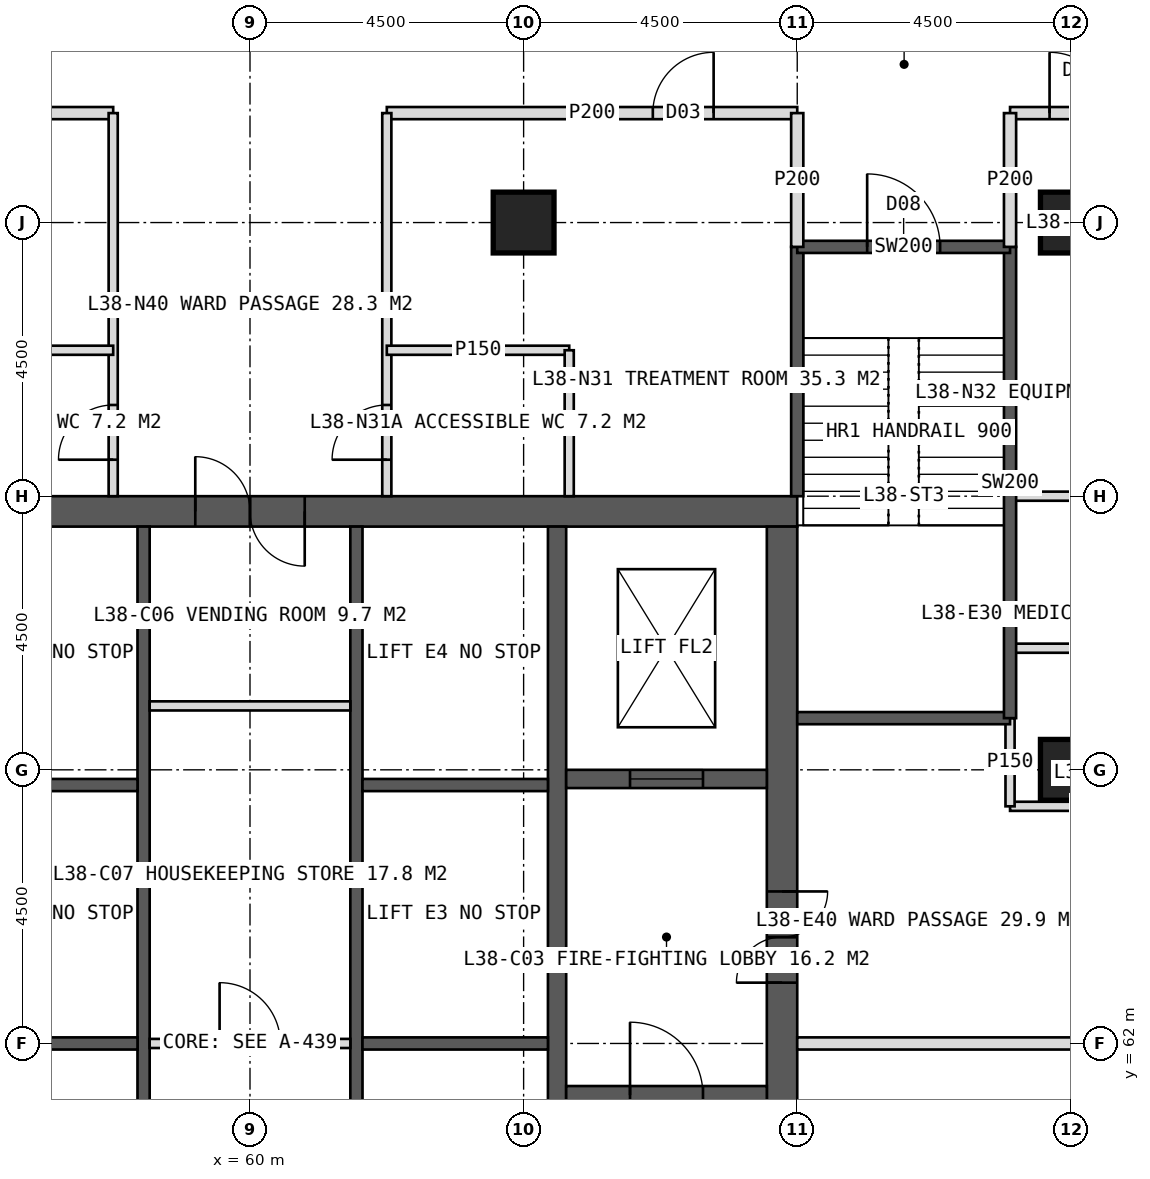
"""IFC4 building model, lengths in metres.
Left out: names, types, materials, properties, quantities, classifications, styles, units other than length and angle.
Written with IfcOpenShell. Run it as: python <this file> out.ifc"""

import sys

from ifc_helpers import new_model, si_unit, direction, frame, frame_2d, origin, origin_2d, place, context, subcontext, project, spatial, rectangle, hollow_rectangle, extrude, element, fill, save


model = new_model("IFC4")
c1 = context("Model", 3, precision=1e-05, world=origin(), true_north=direction((0.0, 1.0)))
c2 = subcontext(c1, "Body", "Model", "MODEL_VIEW")
j1 = project(units=[si_unit("LENGTHUNIT", "METRE"), si_unit("PLANEANGLEUNIT", "RADIAN")], contexts=[c1])
p1 = place(None, origin())
s1 = spatial("IfcSite", under=j1, at=p1, CompositionType="ELEMENT")
p2 = place(p1, origin())
s2 = spatial("IfcBuilding", under=s1, at=p2, CompositionType="ELEMENT")
p3 = place(p2, frame((0.0, 0.0, 160.0)))
s3 = spatial("IfcBuildingStorey", under=s2, at=p3, CompositionType="ELEMENT", Elevation=160.0)
p4 = place(p3, frame((51.0, 70.75, 0.0), z_axis=(0.0, 0.0, 1.0), x_axis=(1.0, 0.0, 0.0)))
e1 = element("IfcWall", 1, at=p4, inside=s3, PredefinedType="SHEAR", context=c2, shape_type="SweptSolid", body=[
    extrude(rectangle(XDim=18.0, YDim=0.5, at=frame_2d((9.0, 0.0))), origin(), (0.0, 0.0, 1.0), 4.0),
])
p5 = place(p4, frame((8.1, 0.0, 0.0)))
e2 = element("IfcOpeningElement", 2, at=p5, cuts=e1, PredefinedType="OPENING", context=c2, shape_type="SweptSolid", body=[
    extrude(rectangle(XDim=1.8, YDim=2.2, at=frame_2d((0.9, 1.1))), frame((0.0, 0.26, 0.0), z_axis=(0.0, -1.0, 0.0), x_axis=(1.0, 0.0, 0.0)), (0.0, 0.0, 1.0), 0.52),
])
p6 = place(p3, frame((68.75, 53.5, 0.0), z_axis=(0.0, 0.0, 1.0), x_axis=(0.0, 1.0, 0.0)))
e3 = element("IfcWall", 3, at=p6, inside=s3, PredefinedType="SHEAR", context=c2, shape_type="SweptSolid", body=[
    extrude(rectangle(XDim=17.0, YDim=0.5, at=frame_2d((8.5, 0.0))), origin(), (0.0, 0.0, 1.0), 4.0),
])
p7 = place(p6, frame((9.5, 0.0, 0.0)))
e4 = element("IfcOpeningElement", 4, at=p7, cuts=e3, PredefinedType="OPENING", context=c2, shape_type="SweptSolid", body=[
    extrude(rectangle(XDim=1.5, YDim=2.2, at=frame_2d((0.75, 1.1))), frame((0.0, 0.26, 0.0), z_axis=(0.0, -1.0, 0.0), x_axis=(1.0, 0.0, 0.0)), (0.0, 0.0, 1.0), 0.52),
])
p8 = place(p3, frame((65.05, 53.5, 0.0), z_axis=(0.0, 0.0, 1.0), x_axis=(0.0, 1.0, 0.0)))
e5 = element("IfcWall", 5, at=p8, inside=s3, PredefinedType="SHEAR", context=c2, shape_type="SweptSolid", body=[
    extrude(rectangle(XDim=17.0, YDim=0.3, at=frame_2d((8.5, 0.0))), origin(), (0.0, 0.0, 1.0), 4.0),
])
p9 = place(p3, frame((58.25, 53.5, 0.0), z_axis=(0.0, 0.0, 1.0), x_axis=(0.0, 1.0, 0.0)))
e6 = element("IfcWall", 6, at=p9, inside=s3, PredefinedType="SHEAR", context=c2, shape_type="SweptSolid", body=[
    extrude(rectangle(XDim=17.0, YDim=0.2, at=frame_2d((8.5, 0.0))), origin(), (0.0, 0.0, 1.0), 4.0),
])
p10 = place(p9, frame((1.375, 0.0, 0.0)))
e7 = element("IfcOpeningElement", 7, at=p10, cuts=e6, PredefinedType="OPENING", context=c2, shape_type="SweptSolid", body=[
    extrude(rectangle(XDim=1.4, YDim=2.2, at=frame_2d((0.7, 1.1))), frame((0.0, 0.11, 0.0), z_axis=(0.0, -1.0, 0.0), x_axis=(1.0, 0.0, 0.0)), (0.0, 0.0, 1.0), 0.22),
])
p11 = place(p9, frame((5.675, 0.0, 0.0)))
e8 = element("IfcOpeningElement", 8, at=p11, cuts=e6, PredefinedType="OPENING", context=c2, shape_type="SweptSolid", body=[
    extrude(rectangle(XDim=1.4, YDim=2.2, at=frame_2d((0.7, 1.1))), frame((0.0, 0.11, 0.0), z_axis=(0.0, -1.0, 0.0), x_axis=(1.0, 0.0, 0.0)), (0.0, 0.0, 1.0), 0.22),
])
p12 = place(p3, frame((61.75, 53.5, 0.0), z_axis=(0.0, 0.0, 1.0), x_axis=(0.0, 1.0, 0.0)))
e9 = element("IfcWall", 9, at=p12, inside=s3, PredefinedType="SHEAR", context=c2, shape_type="SweptSolid", body=[
    extrude(rectangle(XDim=17.0, YDim=0.2, at=frame_2d((8.5, 0.0))), origin(), (0.0, 0.0, 1.0), 4.0),
])
p13 = place(p12, frame((1.375, 0.0, 0.0)))
e10 = element("IfcOpeningElement", 10, at=p13, cuts=e9, PredefinedType="OPENING", context=c2, shape_type="SweptSolid", body=[
    extrude(rectangle(XDim=1.4, YDim=2.2, at=frame_2d((0.7, 1.1))), frame((0.0, 0.11, 0.0), z_axis=(0.0, -1.0, 0.0), x_axis=(1.0, 0.0, 0.0)), (0.0, 0.0, 1.0), 0.22),
])
p14 = place(p12, frame((5.675, 0.0, 0.0)))
e11 = element("IfcOpeningElement", 11, at=p14, cuts=e9, PredefinedType="OPENING", context=c2, shape_type="SweptSolid", body=[
    extrude(rectangle(XDim=1.4, YDim=2.2, at=frame_2d((0.7, 1.1))), frame((0.0, 0.11, 0.0), z_axis=(0.0, -1.0, 0.0), x_axis=(1.0, 0.0, 0.0)), (0.0, 0.0, 1.0), 0.22),
])
for number, where, z_axis, x_axis in (
    (12, (55.1, 62.0, 0.0), (0.0, 0.0, 1.0), (1.0, 0.0, 0.0)),
    (13, (61.85, 62.0, 0.0), (0.0, 0.0, 1.0), (1.0, 0.0, 0.0)),
    (14, (55.1, 66.25, 0.0), (0.0, 0.0, 1.0), (1.0, 0.0, 0.0)),
    (15, (61.85, 66.25, 0.0), (0.0, 0.0, 1.0), (1.0, 0.0, 0.0)),
):
    element("IfcWall", number, at=place(p3, frame(where, z_axis=z_axis, x_axis=x_axis)), inside=s3, PredefinedType="SHEAR", context=c2, shape_type="SweptSolid", body=[
        extrude(rectangle(XDim=3.05, YDim=0.2, at=frame_2d((1.525, 0.0))), origin(), (0.0, 0.0, 1.0), 4.0),
    ])
p15 = place(p3, frame((65.2, 61.15, 0.0), z_axis=(0.0, 0.0, 1.0), x_axis=(1.0, 0.0, 0.0)))
e16 = element("IfcWall", 16, at=p15, inside=s3, PredefinedType="SHEAR", context=c2, shape_type="SweptSolid", body=[
    extrude(rectangle(XDim=3.3, YDim=0.3, at=frame_2d((1.65, 0.0))), origin(), (0.0, 0.0, 1.0), 4.0),
])
p16 = place(p15, frame((1.05, 0.0, 0.0)))
e17 = element("IfcOpeningElement", 17, at=p16, cuts=e16, PredefinedType="OPENING", context=c2, shape_type="SweptSolid", body=[
    extrude(rectangle(XDim=1.2, YDim=2.1, at=frame_2d((0.6, 1.05))), frame((0.0, 0.16, 0.0), z_axis=(0.0, -1.0, 0.0), x_axis=(1.0, 0.0, 0.0)), (0.0, 0.0, 1.0), 0.32),
])
p17 = place(p3, frame((65.2, 66.35, 0.0), z_axis=(0.0, 0.0, 1.0), x_axis=(1.0, 0.0, 0.0)))
e18 = element("IfcWall", 18, at=p17, inside=s3, PredefinedType="SHEAR", context=c2, shape_type="SweptSolid", body=[
    extrude(rectangle(XDim=3.3, YDim=0.3, at=frame_2d((1.65, 0.0))), origin(), (0.0, 0.0, 1.0), 4.0),
])
p18 = place(p17, frame((1.05, 0.0, 0.0)))
e19 = element("IfcOpeningElement", 19, at=p18, cuts=e18, PredefinedType="OPENING", context=c2, shape_type="SweptSolid", body=[
    extrude(rectangle(XDim=1.2, YDim=2.2, at=frame_2d((0.6, 1.1))), frame((0.0, 0.16, 0.0), z_axis=(0.0, -1.0, 0.0), x_axis=(1.0, 0.0, 0.0)), (0.0, 0.0, 1.0), 0.32),
])
for number, where, z_axis, x_axis in (
    (20, (73.5, 75.5, 0.0), (0.0, 0.0, 1.0), (1.0, 0.0, 0.0)),
    (21, (64.5, 75.5, 0.0), (0.0, 0.0, 1.0), (1.0, 0.0, 0.0)),
    (22, (73.5, 66.5, 0.0), (0.0, 0.0, 1.0), (1.0, 0.0, 0.0)),
):
    element("IfcColumn", number, at=place(p3, frame(where, z_axis=z_axis, x_axis=x_axis)), inside=s3, PredefinedType="COLUMN", context=c2, shape_type="SweptSolid", body=[
        extrude(hollow_rectangle(XDim=1.0, YDim=1.0, WallThickness=0.1, at=origin_2d()), origin(), (0.0, 0.0, 1.0), 4.0),
    ])
p19 = place(p3, frame((44.7, 77.3, 0.0), z_axis=(0.0, 0.0, 1.0), x_axis=(1.0, 0.0, 0.0)))
e23 = element("IfcWall", 23, at=p19, inside=s3, PredefinedType="PARTITIONING", context=c2, shape_type="SweptSolid", body=[
    extrude(rectangle(XDim=13.05, YDim=0.2, at=frame_2d((6.525, 0.0))), origin(), (0.0, 0.0, 1.0), 3.75),
])
p20 = place(p19, frame((9.175, 0.0, 0.0)))
e24 = element("IfcOpeningElement", 24, at=p20, cuts=e23, PredefinedType="OPENING", context=c2, shape_type="SweptSolid", body=[
    extrude(rectangle(XDim=1.0, YDim=2.1, at=frame_2d((0.5, 1.05))), frame((0.0, 0.11, 0.0), z_axis=(0.0, -1.0, 0.0), x_axis=(1.0, 0.0, 0.0)), (0.0, 0.0, 1.0), 0.22),
])
p21 = place(p3, frame((62.25, 77.3, 0.0), z_axis=(0.0, 0.0, 1.0), x_axis=(1.0, 0.0, 0.0)))
e25 = element("IfcWall", 25, at=p21, inside=s3, PredefinedType="PARTITIONING", context=c2, shape_type="SweptSolid", body=[
    extrude(rectangle(XDim=6.75, YDim=0.2, at=frame_2d((3.375, 0.0))), origin(), (0.0, 0.0, 1.0), 3.75),
])
p22 = place(p21, frame((4.375, 0.0, 0.0)))
e26 = element("IfcOpeningElement", 26, at=p22, cuts=e25, PredefinedType="OPENING", context=c2, shape_type="SweptSolid", body=[
    extrude(rectangle(XDim=1.0, YDim=2.1, at=frame_2d((0.5, 1.05))), frame((0.0, 0.11, 0.0), z_axis=(0.0, -1.0, 0.0), x_axis=(1.0, 0.0, 0.0)), (0.0, 0.0, 1.0), 0.22),
])
p23 = place(p3, frame((72.5, 77.3, 0.0), z_axis=(0.0, 0.0, 1.0), x_axis=(1.0, 0.0, 0.0)))
e27 = element("IfcWall", 27, at=p23, inside=s3, PredefinedType="PARTITIONING", context=c2, shape_type="SweptSolid", body=[
    extrude(rectangle(XDim=2.8, YDim=0.2, at=frame_2d((1.4, 0.0))), origin(), (0.0, 0.0, 1.0), 3.75),
])
p24 = place(p23, frame((0.65, 0.0, 0.0)))
e28 = element("IfcOpeningElement", 28, at=p24, cuts=e27, PredefinedType="OPENING", context=c2, shape_type="SweptSolid", body=[
    extrude(rectangle(XDim=1.0, YDim=2.1, at=frame_2d((0.5, 1.05))), frame((0.0, 0.11, 0.0), z_axis=(0.0, -1.0, 0.0), x_axis=(1.0, 0.0, 0.0)), (0.0, 0.0, 1.0), 0.22),
])
p25 = place(p3, frame((57.75, 71.0, 0.0), z_axis=(0.0, 0.0, 1.0), x_axis=(0.0, 1.0, 0.0)))
e29 = element("IfcWall", 29, at=p25, inside=s3, PredefinedType="PARTITIONING", context=c2, shape_type="SweptSolid", body=[
    extrude(rectangle(XDim=6.3, YDim=0.15, at=frame_2d((3.15, 0.0))), origin(), (0.0, 0.0, 1.0), 3.75),
])
p26 = place(p25, frame((0.6, 0.0, 0.0)))
e30 = element("IfcOpeningElement", 30, at=p26, cuts=e29, PredefinedType="OPENING", context=c2, shape_type="SweptSolid", body=[
    extrude(rectangle(XDim=0.9, YDim=2.1, at=frame_2d((0.45, 1.05))), frame((0.0, 0.085, 0.0), z_axis=(0.0, -1.0, 0.0), x_axis=(1.0, 0.0, 0.0)), (0.0, 0.0, 1.0), 0.17),
])
p27 = place(p3, frame((62.25, 71.0, 0.0), z_axis=(0.0, 0.0, 1.0), x_axis=(0.0, 1.0, 0.0)))
e31 = element("IfcWall", 31, at=p27, inside=s3, PredefinedType="PARTITIONING", context=c2, shape_type="SweptSolid", body=[
    extrude(rectangle(XDim=6.3, YDim=0.15, at=frame_2d((3.15, 0.0))), origin(), (0.0, 0.0, 1.0), 3.75),
])
p28 = place(p27, frame((0.6, 0.0, 0.0)))
e32 = element("IfcOpeningElement", 32, at=p28, cuts=e31, PredefinedType="OPENING", context=c2, shape_type="SweptSolid", body=[
    extrude(rectangle(XDim=0.9, YDim=2.1, at=frame_2d((0.45, 1.05))), frame((0.0, 0.085, 0.0), z_axis=(0.0, -1.0, 0.0), x_axis=(1.0, 0.0, 0.0)), (0.0, 0.0, 1.0), 0.17),
])
for number, where, z_axis, x_axis in (
    (33, (54.75, 73.4, 0.0), (0.0, 0.0, 1.0), (1.0, 0.0, 0.0)),
    (34, (62.25, 73.4, 0.0), (0.0, 0.0, 1.0), (1.0, 0.0, 0.0)),
):
    element("IfcWall", number, at=place(p3, frame(where, z_axis=z_axis, x_axis=x_axis)), inside=s3, PredefinedType="PARTITIONING", context=c2, shape_type="SweptSolid", body=[
        extrude(rectangle(XDim=3.0, YDim=0.15, at=frame_2d((1.5, 0.0))), origin(), (0.0, 0.0, 1.0), 3.75),
    ])
p29 = place(p3, frame((65.25, 71.0, 0.0), z_axis=(0.0, 0.0, 1.0), x_axis=(0.0, 1.0, 0.0)))
e35 = element("IfcWall", 35, at=p29, inside=s3, PredefinedType="PARTITIONING", context=c2, shape_type="SweptSolid", body=[
    extrude(rectangle(XDim=2.4, YDim=0.15, at=frame_2d((1.2, 0.0))), origin(), (0.0, 0.0, 1.0), 3.75),
])
for number, where, z_axis, x_axis in (
    (36, (72.5, 71.0, 0.0), (0.0, 0.0, 1.0), (1.0, 0.0, 0.0)),
    (37, (72.5, 65.9, 0.0), (0.0, 0.0, 1.0), (1.0, 0.0, 0.0)),
):
    element("IfcWall", number, at=place(p3, frame(where, z_axis=z_axis, x_axis=x_axis)), inside=s3, PredefinedType="PARTITIONING", context=c2, shape_type="SweptSolid", body=[
        extrude(rectangle(XDim=2.8, YDim=0.15, at=frame_2d((1.4, 0.0))), origin(), (0.0, 0.0, 1.0), 3.75),
    ])
p30 = place(p3, frame((69.0, 62.0, 0.0), z_axis=(0.0, 0.0, 1.0), x_axis=(1.0, 0.0, 0.0)))
e38 = element("IfcWall", 38, at=p30, inside=s3, PredefinedType="SOLIDWALL", context=c2, shape_type="SweptSolid", body=[
    extrude(rectangle(XDim=6.3, YDim=0.2, at=frame_2d((3.15, 0.0))), origin(), (0.0, 0.0, 1.0), 2.95),
])
p31 = place(p3, frame((72.5, 68.5, 0.0), z_axis=(0.0, 0.0, 1.0), x_axis=(1.0, 0.0, 0.0)))
e39 = element("IfcWall", 39, at=p31, inside=s3, PredefinedType="PARTITIONING", context=c2, shape_type="SweptSolid", body=[
    extrude(rectangle(XDim=2.8, YDim=0.15, at=frame_2d((1.4, 0.0))), origin(), (0.0, 0.0, 1.0), 3.75),
])
p32 = place(p3, frame((58.35, 62.0, 0.0), z_axis=(0.0, 0.0, 1.0), x_axis=(1.0, 0.0, 0.0)))
e40 = element("IfcWall", 40, at=p32, inside=s3, PredefinedType="PARTITIONING", context=c2, shape_type="SweptSolid", body=[
    extrude(rectangle(XDim=3.3, YDim=0.15, at=frame_2d((1.65, 0.0))), origin(), (0.0, 0.0, 1.0), 3.75),
])
p33 = place(p32, frame((1.15, 0.0, 0.0)))
e41 = element("IfcOpeningElement", 41, at=p33, cuts=e40, PredefinedType="OPENING", context=c2, shape_type="SweptSolid", body=[
    extrude(rectangle(XDim=1.0, YDim=2.1, at=frame_2d((0.5, 1.05))), frame((0.0, 0.085, 0.0), z_axis=(0.0, -1.0, 0.0), x_axis=(1.0, 0.0, 0.0)), (0.0, 0.0, 1.0), 0.17),
])
p34 = place(p3, frame((58.35, 67.551, 0.0), z_axis=(0.0, 0.0, 1.0), x_axis=(1.0, 0.0, 0.0)))
e42 = element("IfcWall", 42, at=p34, inside=s3, PredefinedType="PARTITIONING", context=c2, shape_type="SweptSolid", body=[
    extrude(rectangle(XDim=3.3, YDim=0.15, at=frame_2d((1.65, 0.0))), origin(), (0.0, 0.0, 1.0), 3.75),
])
p35 = place(p3, frame((72.5, 65.9, 0.0), z_axis=(0.0, 0.0, 1.0), x_axis=(0.0, 1.0, 0.0)))
e43 = element("IfcWall", 43, at=p35, inside=s3, PredefinedType="PARTITIONING", context=c2, shape_type="SweptSolid", body=[
    extrude(rectangle(XDim=1.45, YDim=0.15, at=frame_2d((0.725, 0.0))), origin(), (0.0, 0.0, 1.0), 3.75),
])
p36 = place(p3, frame((69.0, 71.0, 0.0), z_axis=(0.0, 0.0, 1.0), x_axis=(0.0, 1.0, 0.0)))
e44 = element("IfcWall", 44, at=p36, inside=s3, PredefinedType="SOLIDWALL", context=c2, shape_type="SweptSolid", body=[
    extrude(rectangle(XDim=4.1, YDim=0.2, at=frame_2d((2.05, 0.0))), origin(), (0.0, 0.0, 1.0), 3.75),
])
p37 = place(p3, frame((69.0, 67.35, 0.0), z_axis=(0.0, 0.0, 1.0), x_axis=(1.0, 0.0, 0.0)))
e45 = element("IfcWall", 45, at=p37, inside=s3, PredefinedType="SOLIDWALL", context=c2, shape_type="SweptSolid", body=[
    extrude(rectangle(XDim=3.5, YDim=0.2, at=frame_2d((1.75, 0.0))), origin(), (0.0, 0.0, 1.0), 3.75),
])
p38 = place(p3, frame((72.5, 67.35, 0.0), z_axis=(0.0, 0.0, 1.0), x_axis=(0.0, 1.0, 0.0)))
e46 = element("IfcWall", 46, at=p38, inside=s3, PredefinedType="SOLIDWALL", context=c2, shape_type="SweptSolid", body=[
    extrude(rectangle(XDim=7.75, YDim=0.2, at=frame_2d((3.875, 0.0))), origin(), (0.0, 0.0, 1.0), 3.75),
])
p39 = place(p3, frame((69.0, 75.1, 0.0), z_axis=(0.0, 0.0, 1.0), x_axis=(1.0, 0.0, 0.0)))
e47 = element("IfcWall", 47, at=p39, inside=s3, PredefinedType="SOLIDWALL", context=c2, shape_type="SweptSolid", body=[
    extrude(rectangle(XDim=3.5, YDim=0.2, at=frame_2d((1.75, 0.0))), origin(), (0.0, 0.0, 1.0), 3.75),
])
p40 = place(p39, frame((1.15, 0.0, 0.0)))
e48 = element("IfcOpeningElement", 48, at=p40, cuts=e47, PredefinedType="OPENING", context=c2, shape_type="SweptSolid", body=[
    extrude(rectangle(XDim=1.2, YDim=2.1, at=frame_2d((0.6, 1.05))), frame((0.0, 0.11, 0.0), z_axis=(0.0, -1.0, 0.0), x_axis=(1.0, 0.0, 0.0)), (0.0, 0.0, 1.0), 0.22),
])
for number, where, z_axis, x_axis in (
    (49, (69.0, 75.1, 0.0), (0.0, 0.0, 1.0), (0.0, 1.0, 0.0)),
    (50, (72.5, 75.1, 0.0), (0.0, 0.0, 1.0), (0.0, 1.0, 0.0)),
):
    element("IfcWall", number, at=place(p3, frame(where, z_axis=z_axis, x_axis=x_axis)), inside=s3, PredefinedType="PARTITIONING", context=c2, shape_type="SweptSolid", body=[
        extrude(rectangle(XDim=2.2, YDim=0.2, at=frame_2d((1.1, 0.0))), origin(), (0.0, 0.0, 1.0), 3.75),
    ])
p41 = place(p26, origin())
e51 = element("IfcDoor", 51, at=p41, inside=s3, OperationType="SINGLE_SWING_LEFT", PredefinedType="DOOR", context=c2, shape_type="SweptSolid", body=[
    extrude(rectangle(XDim=0.9, YDim=2.1, at=frame_2d((0.45, 1.05))), frame((0.0, 0.025, 0.0), z_axis=(0.0, -1.0, 0.0), x_axis=(1.0, 0.0, 0.0)), (0.0, 0.0, 1.0), 0.05),
])
fill(e30, e51)
p42 = place(p28, origin())
e52 = element("IfcDoor", 52, at=p42, inside=s3, OperationType="SINGLE_SWING_LEFT", PredefinedType="DOOR", context=c2, shape_type="SweptSolid", body=[
    extrude(rectangle(XDim=0.9, YDim=2.1, at=frame_2d((0.45, 1.05))), frame((0.0, 0.025, 0.0), z_axis=(0.0, -1.0, 0.0), x_axis=(1.0, 0.0, 0.0)), (0.0, 0.0, 1.0), 0.05),
])
fill(e32, e52)
p43 = place(p22, origin())
e53 = element("IfcDoor", 53, at=p43, inside=s3, OperationType="SINGLE_SWING_RIGHT", PredefinedType="DOOR", context=c2, shape_type="SweptSolid", body=[
    extrude(rectangle(XDim=1.0, YDim=2.1, at=frame_2d((0.5, 1.05))), frame((0.0, 0.025, 0.0), z_axis=(0.0, -1.0, 0.0), x_axis=(1.0, 0.0, 0.0)), (0.0, 0.0, 1.0), 0.05),
])
fill(e26, e53)
p44 = place(p24, origin())
e54 = element("IfcDoor", 54, at=p44, inside=s3, OperationType="SINGLE_SWING_LEFT", PredefinedType="DOOR", context=c2, shape_type="SweptSolid", body=[
    extrude(rectangle(XDim=1.0, YDim=2.1, at=frame_2d((0.5, 1.05))), frame((0.0, 0.025, 0.0), z_axis=(0.0, -1.0, 0.0), x_axis=(1.0, 0.0, 0.0)), (0.0, 0.0, 1.0), 0.05),
])
fill(e28, e54)
p45 = place(p7, origin())
e55 = element("IfcDoor", 55, at=p45, inside=s3, OperationType="DOUBLE_DOOR_SINGLE_SWING", PredefinedType="DOOR", context=c2, shape_type="SweptSolid", body=[
    extrude(rectangle(XDim=1.5, YDim=2.2, at=frame_2d((0.75, 1.1))), frame((0.0, 0.025, 0.0), z_axis=(0.0, -1.0, 0.0), x_axis=(1.0, 0.0, 0.0)), (0.0, 0.0, 1.0), 0.05),
])
fill(e4, e55)
p46 = place(p16, origin())
e56 = element("IfcDoor", 56, at=p46, inside=s3, OperationType="SINGLE_SWING_LEFT", PredefinedType="DOOR", context=c2, shape_type="SweptSolid", body=[
    extrude(rectangle(XDim=1.2, YDim=2.1, at=frame_2d((0.6, 1.05))), frame((0.0, 0.025, 0.0), z_axis=(0.0, -1.0, 0.0), x_axis=(1.0, 0.0, 0.0)), (0.0, 0.0, 1.0), 0.05),
])
fill(e17, e56)
p47 = place(p18, origin())
e57 = element("IfcDoor", 57, at=p47, inside=s3, OperationType="SLIDING_TO_LEFT", PredefinedType="DOOR", context=c2, shape_type="SweptSolid", body=[
    extrude(rectangle(XDim=1.2, YDim=2.2, at=frame_2d((0.6, 1.1))), frame((0.0, 0.025, 0.0), z_axis=(0.0, -1.0, 0.0), x_axis=(1.0, 0.0, 0.0)), (0.0, 0.0, 1.0), 0.05),
])
fill(e19, e57)
p48 = place(p33, origin())
e58 = element("IfcDoor", 58, at=p48, inside=s3, OperationType="SINGLE_SWING_LEFT", PredefinedType="DOOR", context=c2, shape_type="SweptSolid", body=[
    extrude(rectangle(XDim=1.0, YDim=2.1, at=frame_2d((0.5, 1.05))), frame((0.0, 0.025, 0.0), z_axis=(0.0, -1.0, 0.0), x_axis=(1.0, 0.0, 0.0)), (0.0, 0.0, 1.0), 0.05),
])
fill(e41, e58)
p49 = place(p5, origin())
e59 = element("IfcDoor", 59, at=p49, inside=s3, OperationType="DOUBLE_DOOR_SINGLE_SWING", PredefinedType="DOOR", context=c2, shape_type="SweptSolid", body=[
    extrude(rectangle(XDim=1.8, YDim=2.2, at=frame_2d((0.9, 1.1))), frame((0.0, 0.025, 0.0), z_axis=(0.0, -1.0, 0.0), x_axis=(1.0, 0.0, 0.0)), (0.0, 0.0, 1.0), 0.05),
])
fill(e2, e59)
p50 = place(p40, origin())
e60 = element("IfcDoor", 60, at=p50, inside=s3, OperationType="SINGLE_SWING_LEFT", PredefinedType="DOOR", context=c2, shape_type="SweptSolid", body=[
    extrude(rectangle(XDim=1.2, YDim=2.1, at=frame_2d((0.6, 1.05))), frame((0.0, 0.025, 0.0), z_axis=(0.0, -1.0, 0.0), x_axis=(1.0, 0.0, 0.0)), (0.0, 0.0, 1.0), 0.05),
])
fill(e48, e60)
save(model, sys.argv[1])
